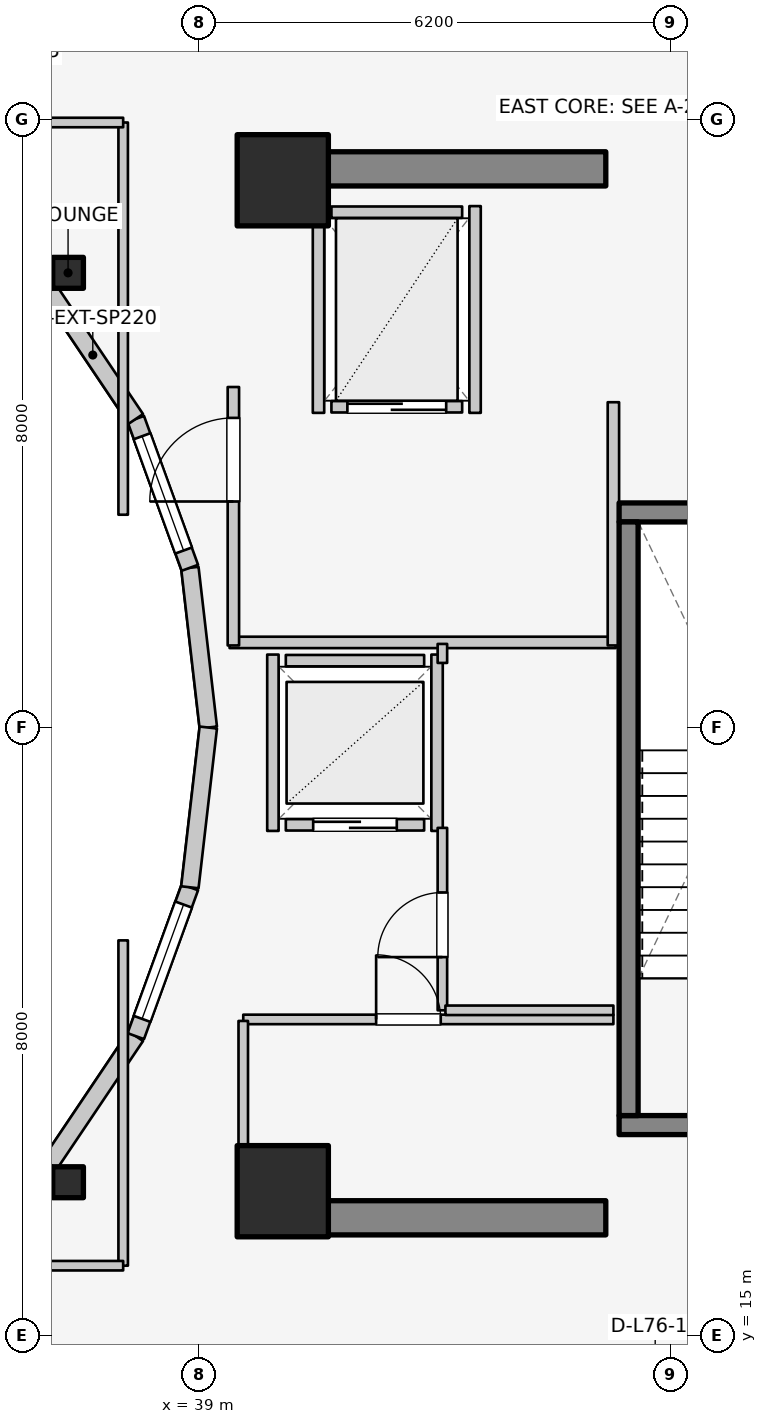
"""IFC4 building model, lengths in metres.
Left out: names, types, materials, properties, quantities, classifications, styles, units other than length and angle.
Written with IfcOpenShell. Run it as: python <this file> out.ifc"""

import sys

from ifc_helpers import new_model, si_unit, direction, frame, frame_2d, origin, origin_2d, place, context, subcontext, project, spatial, rectangle, i_section, extrude, element, fill, save


model = new_model("IFC4")
c1 = context("Model", 3, precision=1e-05, world=origin(), true_north=direction((0.0, 1.0)))
c2 = subcontext(c1, "Body", "Model", "MODEL_VIEW")
j1 = project(units=[si_unit("LENGTHUNIT", "METRE"), si_unit("PLANEANGLEUNIT", "RADIAN")], contexts=[c1])
p1 = place(None, origin())
s1 = spatial("IfcSite", under=j1, at=p1, CompositionType="ELEMENT")
p2 = place(p1, origin())
s2 = spatial("IfcBuilding", under=s1, at=p2, CompositionType="ELEMENT")
p3 = place(p2, frame((0.0, 0.0, 249.6)))
s3 = spatial("IfcBuildingStorey", under=s2, at=p3, CompositionType="ELEMENT", Elevation=249.6)
for number, where, z_axis, x_axis in (
    (1, (39.85, 16.55, 0.0), (0.0, 0.0, 1.0), (1.0, 0.0, 0.0)),
    (2, (39.85, 30.35, 0.0), (0.0, 0.0, 1.0), (1.0, 0.0, 0.0)),
):
    element("IfcWall", number, at=place(p3, frame(where, z_axis=z_axis, x_axis=x_axis)), inside=s3, PredefinedType="SHEAR", context=c2, shape_type="SweptSolid", body=[
        extrude(rectangle(XDim=4.5, YDim=0.45, at=frame_2d((2.25, 0.0))), origin(), (0.0, 0.0, 1.0), 3.6),
    ])
p4 = place(p3, frame((44.525, 17.77, 0.0), z_axis=(0.0, 0.0, 1.0), x_axis=(1.0, 0.0, 0.0)))
e3 = element("IfcWall", 3, at=p4, inside=s3, PredefinedType="SOLIDWALL", context=c2, shape_type="SweptSolid", body=[
    extrude(rectangle(XDim=3.37, YDim=0.25, at=frame_2d((1.685, 0.0))), origin(), (0.0, 0.0, 1.0), 3.6),
])
p5 = place(p4, frame((1.135, 0.0, 0.0)))
e4 = element("IfcOpeningElement", 4, at=p5, cuts=e3, PredefinedType="OPENING", context=c2, shape_type="SweptSolid", body=[
    extrude(rectangle(XDim=1.1, YDim=2.1, at=frame_2d((0.55, 1.05))), frame((0.0, 0.135, 0.0), z_axis=(0.0, -1.0, 0.0), x_axis=(1.0, 0.0, 0.0)), (0.0, 0.0, 1.0), 0.27),
])
p6 = place(p3, frame((44.525, 25.83, 0.0), z_axis=(0.0, 0.0, 1.0), x_axis=(1.0, 0.0, 0.0)))
e5 = element("IfcWall", 5, at=p6, inside=s3, PredefinedType="SOLIDWALL", context=c2, shape_type="SweptSolid", body=[
    extrude(rectangle(XDim=3.37, YDim=0.25, at=frame_2d((1.685, 0.0))), origin(), (0.0, 0.0, 1.0), 3.6),
])
p7 = place(p3, frame((44.65, 17.895, 0.0), z_axis=(0.0, 0.0, 1.0), x_axis=(0.0, 1.0, 0.0)))
e6 = element("IfcWall", 6, at=p7, inside=s3, PredefinedType="SOLIDWALL", context=c2, shape_type="SweptSolid", body=[
    extrude(rectangle(XDim=7.81, YDim=0.25, at=frame_2d((3.905, 0.0))), origin(), (0.0, 0.0, 1.0), 3.6),
])
for number, where, z_axis, x_axis in (
    (7, (40.1, 16.9, 0.0), (0.0, 0.0, 1.0), (1.0, 0.0, 0.0)),
    (8, (40.1, 30.2, 0.0), (0.0, 0.0, 1.0), (1.0, 0.0, 0.0)),
):
    element("IfcColumn", number, at=place(p3, frame(where, z_axis=z_axis, x_axis=x_axis)), inside=s3, PredefinedType="COLUMN", context=c2, shape_type="SweptSolid", body=[
        extrude(rectangle(XDim=1.2, YDim=1.2, at=origin_2d()), origin(), (0.0, 0.0, 1.0), 3.6),
    ])
for number, where, z_axis, x_axis in (
    (9, (37.275, 28.982, 0.0), (0.0, 0.0, 1.0), (1.0, 0.0, 0.0)),
    (10, (37.275, 17.018, 0.0), (0.0, 0.0, 1.0), (1.0, 0.0, 0.0)),
):
    element("IfcColumn", number, at=place(p3, frame(where, z_axis=z_axis, x_axis=x_axis)), inside=s3, PredefinedType="COLUMN", context=c2, shape_type="SweptSolid", body=[
        extrude(i_section(OverallWidth=0.404, OverallDepth=0.407, WebThickness=0.027, FlangeThickness=0.044, FilletRadius=0.025, at=origin_2d()), origin(), (0.0, 0.0, 1.0), 3.6),
    ])
p8 = place(p3, frame((39.12, 23.0, 0.0), z_axis=(0.0, 0.0, 1.0), x_axis=(-0.114711713601, 0.993398823617, 0.0)))
e11 = element("IfcWall", 11, at=p8, inside=s3, PredefinedType="STANDARD", context=c2, shape_type="SweptSolid", body=[
    extrude(rectangle(XDim=2.115, YDim=0.23, at=frame_2d((1.058, 0.0))), origin(), (0.0, 0.0, 1.0), 3.28),
])
p9 = place(p3, frame((38.877, 25.102, 0.0), z_axis=(0.0, 0.0, 1.0), x_axis=(-0.341423187295, 0.93990968033, 0.0)))
e12 = element("IfcWall", 12, at=p9, inside=s3, PredefinedType="STANDARD", context=c2, shape_type="SweptSolid", body=[
    extrude(rectangle(XDim=2.084, YDim=0.23, at=frame_2d((1.042, 0.0))), origin(), (0.0, 0.0, 1.0), 3.28),
])
p10 = place(p9, frame((0.242, 0.0, 0.85)))
e13 = element("IfcOpeningElement", 13, at=p10, cuts=e12, PredefinedType="OPENING", context=c2, shape_type="SweptSolid", body=[
    extrude(rectangle(XDim=1.6, YDim=1.65, at=frame_2d((0.8, 0.825))), frame((0.0, 0.125, 0.0), z_axis=(0.0, -1.0, 0.0), x_axis=(1.0, 0.0, 0.0)), (0.0, 0.0, 1.0), 0.25),
])
p11 = place(p3, frame((38.166, 27.06, 0.0), z_axis=(0.0, 0.0, 1.0), x_axis=(-0.558197800898, 0.829707909492, 0.0)))
e14 = element("IfcWall", 14, at=p11, inside=s3, PredefinedType="STANDARD", context=c2, shape_type="SweptSolid", body=[
    extrude(rectangle(XDim=2.027, YDim=0.23, at=frame_2d((1.013, 0.0))), origin(), (0.0, 0.0, 1.0), 2.6),
])
for number, where, z_axis, x_axis in (
    (15, (37.035, 28.742, 0.0), (0.0, 0.0, 1.0), (-0.753, 0.659, 0.0)),
    (16, (35.56, 15.968, 0.0), (0.0, 0.0, 1.0), (0.753, 0.659, 0.0)),
):
    element("IfcWall", number, at=place(p3, frame(where, z_axis=z_axis, x_axis=x_axis)), inside=s3, PredefinedType="STANDARD", context=c2, shape_type="SweptSolid", body=[
        extrude(rectangle(XDim=1.959, YDim=0.23, at=frame_2d((0.98, 0.0))), origin(), (0.0, 0.0, 1.0), 2.6),
    ])
p12 = place(p3, frame((37.035, 17.258, 0.0), z_axis=(0.0, 0.0, 1.0), x_axis=(0.558197800898, 0.829707909492, 0.0)))
e17 = element("IfcWall", 17, at=p12, inside=s3, PredefinedType="STANDARD", context=c2, shape_type="SweptSolid", body=[
    extrude(rectangle(XDim=2.027, YDim=0.23, at=frame_2d((1.013, 0.0))), origin(), (0.0, 0.0, 1.0), 2.6),
])
p13 = place(p3, frame((38.166, 18.94, 0.0), z_axis=(0.0, 0.0, 1.0), x_axis=(0.341423187295, 0.93990968033, 0.0)))
e18 = element("IfcWall", 18, at=p13, inside=s3, PredefinedType="STANDARD", context=c2, shape_type="SweptSolid", body=[
    extrude(rectangle(XDim=2.084, YDim=0.23, at=frame_2d((1.042, 0.0))), origin(), (0.0, 0.0, 1.0), 3.28),
])
p14 = place(p13, frame((0.242, 0.0, 0.85)))
e19 = element("IfcOpeningElement", 19, at=p14, cuts=e18, PredefinedType="OPENING", context=c2, shape_type="SweptSolid", body=[
    extrude(rectangle(XDim=1.6, YDim=1.65, at=frame_2d((0.8, 0.825))), frame((0.0, 0.125, 0.0), z_axis=(0.0, -1.0, 0.0), x_axis=(1.0, 0.0, 0.0)), (0.0, 0.0, 1.0), 0.25),
])
p15 = place(p3, frame((38.877, 20.898, 0.0), z_axis=(0.0, 0.0, 1.0), x_axis=(0.114711713601, 0.993398823617, 0.0)))
e20 = element("IfcWall", 20, at=p15, inside=s3, PredefinedType="STANDARD", context=c2, shape_type="SweptSolid", body=[
    extrude(rectangle(XDim=2.115, YDim=0.23, at=frame_2d((1.058, 0.0))), origin(), (0.0, 0.0, 1.0), 3.28),
])
p16 = place(p3, frame((40.14, 21.72, 0.0), z_axis=(0.0, 0.0, 1.0), x_axis=(1.0, 0.0, 0.0)))
e21 = element("IfcWall", 21, at=p16, inside=s3, PredefinedType="SOLIDWALL", context=c2, shape_type="SweptSolid", body=[
    extrude(rectangle(XDim=1.82, YDim=0.15, at=frame_2d((0.91, 0.0))), origin(), (0.0, 0.0, 1.0), 2.62),
])
p17 = place(p16, frame((0.36, 0.0, 0.0)))
e22 = element("IfcOpeningElement", 22, at=p17, cuts=e21, PredefinedType="OPENING", context=c2, shape_type="SweptSolid", body=[
    extrude(rectangle(XDim=1.1, YDim=2.1, at=frame_2d((0.55, 1.05))), frame((0.0, 0.085, 0.0), z_axis=(0.0, -1.0, 0.0), x_axis=(1.0, 0.0, 0.0)), (0.0, 0.0, 1.0), 0.17),
])
p18 = place(p3, frame((40.14, 23.88, 0.0), z_axis=(0.0, 0.0, 1.0), x_axis=(1.0, 0.0, 0.0)))
e23 = element("IfcWall", 23, at=p18, inside=s3, PredefinedType="SOLIDWALL", context=c2, shape_type="SweptSolid", body=[
    extrude(rectangle(XDim=1.82, YDim=0.15, at=frame_2d((0.91, 0.0))), origin(), (0.0, 0.0, 1.0), 2.62),
])
p19 = place(p3, frame((39.97, 21.64, 0.0), z_axis=(0.0, 0.0, 1.0), x_axis=(0.0, 1.0, 0.0)))
e24 = element("IfcWall", 24, at=p19, inside=s3, PredefinedType="SOLIDWALL", context=c2, shape_type="SweptSolid", body=[
    extrude(rectangle(XDim=2.32, YDim=0.15, at=frame_2d((1.16, 0.0))), origin(), (0.0, 0.0, 1.0), 2.62),
])
p20 = place(p3, frame((42.13, 21.64, 0.0), z_axis=(0.0, 0.0, 1.0), x_axis=(0.0, 1.0, 0.0)))
e25 = element("IfcWall", 25, at=p20, inside=s3, PredefinedType="SOLIDWALL", context=c2, shape_type="SweptSolid", body=[
    extrude(rectangle(XDim=2.32, YDim=0.15, at=frame_2d((1.16, 0.0))), origin(), (0.0, 0.0, 1.0), 3.295),
])
p21 = place(p3, frame((40.74, 27.22, 0.0), z_axis=(0.0, 0.0, 1.0), x_axis=(1.0, 0.0, 0.0)))
e26 = element("IfcWall", 26, at=p21, inside=s3, PredefinedType="SOLIDWALL", context=c2, shape_type="SweptSolid", body=[
    extrude(rectangle(XDim=1.72, YDim=0.15, at=frame_2d((0.86, 0.0))), origin(), (0.0, 0.0, 1.0), 3.295),
])
p22 = place(p21, frame((0.21, 0.0, 0.0)))
e27 = element("IfcOpeningElement", 27, at=p22, cuts=e26, PredefinedType="OPENING", context=c2, shape_type="SweptSolid", body=[
    extrude(rectangle(XDim=1.3, YDim=2.1, at=frame_2d((0.65, 1.05))), frame((0.0, 0.085, 0.0), z_axis=(0.0, -1.0, 0.0), x_axis=(1.0, 0.0, 0.0)), (0.0, 0.0, 1.0), 0.17),
])
p23 = place(p3, frame((40.74, 29.78, 0.0), z_axis=(0.0, 0.0, 1.0), x_axis=(1.0, 0.0, 0.0)))
e28 = element("IfcWall", 28, at=p23, inside=s3, PredefinedType="SOLIDWALL", context=c2, shape_type="SweptSolid", body=[
    extrude(rectangle(XDim=1.72, YDim=0.15, at=frame_2d((0.86, 0.0))), origin(), (0.0, 0.0, 1.0), 3.295),
])
for number, where, z_axis, x_axis in (
    (29, (40.57, 27.14, 0.0), (0.0, 0.0, 1.0), (0.0, 1.0, 0.0)),
    (30, (42.63, 27.14, 0.0), (0.0, 0.0, 1.0), (0.0, 1.0, 0.0)),
):
    element("IfcWall", number, at=place(p3, frame(where, z_axis=z_axis, x_axis=x_axis)), inside=s3, PredefinedType="SOLIDWALL", context=c2, shape_type="SweptSolid", body=[
        extrude(rectangle(XDim=2.72, YDim=0.15, at=frame_2d((1.36, 0.0))), origin(), (0.0, 0.0, 1.0), 3.295),
    ])
p24 = place(p3, frame((39.4, 24.12, 0.0), z_axis=(0.0, 0.0, 1.0), x_axis=(1.0, 0.0, 0.0)))
e31 = element("IfcWall", 31, at=p24, inside=s3, PredefinedType="PARTITIONING", context=c2, shape_type="SweptSolid", body=[
    extrude(rectangle(XDim=5.08, YDim=0.15, at=frame_2d((2.54, 0.0))), origin(), (0.0, 0.0, 1.0), 2.62),
])
p25 = place(p3, frame((44.45, 24.08, 0.0), z_axis=(0.0, 0.0, 1.0), x_axis=(0.0, 1.0, 0.0)))
e32 = element("IfcWall", 32, at=p25, inside=s3, PredefinedType="PARTITIONING", context=c2, shape_type="SweptSolid", body=[
    extrude(rectangle(XDim=3.2, YDim=0.15, at=frame_2d((1.6, 0.0))), origin(), (0.0, 0.0, 1.0), 3.295),
])
p26 = place(p3, frame((39.45, 24.08, 0.0), z_axis=(0.0, 0.0, 1.0), x_axis=(0.0, 1.0, 0.0)))
e33 = element("IfcWall", 33, at=p26, inside=s3, PredefinedType="PARTITIONING", context=c2, shape_type="SweptSolid", body=[
    extrude(rectangle(XDim=3.4, YDim=0.15, at=frame_2d((1.7, 0.0))), origin(), (0.0, 0.0, 1.0), 3.295),
])
p27 = place(p26, frame((1.894, 0.0, 0.0)))
e34 = element("IfcOpeningElement", 34, at=p27, cuts=e33, PredefinedType="OPENING", context=c2, shape_type="SweptSolid", body=[
    extrude(rectangle(XDim=1.1, YDim=2.1, at=frame_2d((0.55, 1.05))), frame((0.0, 0.085, 0.0), z_axis=(0.0, -1.0, 0.0), x_axis=(1.0, 0.0, 0.0)), (0.0, 0.0, 1.0), 0.17),
])
p28 = place(p3, frame((39.58, 19.16, 0.0), z_axis=(0.0, 0.0, 1.0), x_axis=(1.0, 0.0, 0.0)))
e35 = element("IfcWall", 35, at=p28, inside=s3, PredefinedType="PARTITIONING", context=c2, shape_type="SweptSolid", body=[
    extrude(rectangle(XDim=4.87, YDim=0.125, at=frame_2d((2.435, 0.0))), origin(), (0.0, 0.0, 1.0), 2.62),
])
p29 = place(p28, frame((1.748, 0.0, 0.0)))
e36 = element("IfcOpeningElement", 36, at=p29, cuts=e35, PredefinedType="OPENING", context=c2, shape_type="SweptSolid", body=[
    extrude(rectangle(XDim=0.85, YDim=2.05, at=frame_2d((0.425, 1.025))), frame((0.0, 0.073, 0.0), z_axis=(0.0, -1.0, 0.0), x_axis=(1.0, 0.0, 0.0)), (0.0, 0.0, 1.0), 0.145),
])
p30 = place(p3, frame((39.58, 17.1, 0.0), z_axis=(0.0, 0.0, 1.0), x_axis=(0.0, 1.0, 0.0)))
e37 = element("IfcWall", 37, at=p30, inside=s3, PredefinedType="PARTITIONING", context=c2, shape_type="SweptSolid", body=[
    extrude(rectangle(XDim=2.04, YDim=0.125, at=frame_2d((1.02, 0.0))), origin(), (0.0, 0.0, 1.0), 2.672),
])
p31 = place(p3, frame((42.2, 19.28, 0.0), z_axis=(0.0, 0.0, 1.0), x_axis=(0.0, 1.0, 0.0)))
e38 = element("IfcWall", 38, at=p31, inside=s3, PredefinedType="PARTITIONING", context=c2, shape_type="SweptSolid", body=[
    extrude(rectangle(XDim=2.4, YDim=0.125, at=frame_2d((1.2, 0.0))), origin(), (0.0, 0.0, 1.0), 3.295),
])
p32 = place(p31, frame((0.7, 0.0, 0.0)))
e39 = element("IfcOpeningElement", 39, at=p32, cuts=e38, PredefinedType="OPENING", context=c2, shape_type="SweptSolid", body=[
    extrude(rectangle(XDim=0.85, YDim=2.05, at=frame_2d((0.425, 1.025))), frame((0.0, 0.073, 0.0), z_axis=(0.0, -1.0, 0.0), x_axis=(1.0, 0.0, 0.0)), (0.0, 0.0, 1.0), 0.145),
])
p33 = place(p3, frame((42.2, 23.85, 0.0), z_axis=(0.0, 0.0, 1.0), x_axis=(0.0, 1.0, 0.0)))
e40 = element("IfcWall", 40, at=p33, inside=s3, PredefinedType="PARTITIONING", context=c2, shape_type="SweptSolid", body=[
    extrude(rectangle(XDim=0.25, YDim=0.125, at=frame_2d((0.125, 0.0))), origin(), (0.0, 0.0, 1.0), 3.295),
])
p34 = place(p3, frame((42.24, 19.28, 0.0), z_axis=(0.0, 0.0, 1.0), x_axis=(1.0, 0.0, 0.0)))
e41 = element("IfcWall", 41, at=p34, inside=s3, PredefinedType="PARTITIONING", context=c2, shape_type="SweptSolid", body=[
    extrude(rectangle(XDim=2.21, YDim=0.125, at=frame_2d((1.105, 0.0))), origin(), (0.0, 0.0, 1.0), 2.62),
])
p35 = place(p3, frame((35.55, 30.015, 0.0), z_axis=(0.0, 0.0, 1.0), x_axis=(0.522763432117, 0.852477796802, 0.0)))
e42 = element("IfcWall", 42, at=p35, inside=s3, PredefinedType="PARTITIONING", context=c2, shape_type="SweptSolid", body=[
    extrude(rectangle(XDim=3.269, YDim=0.125, at=frame_2d((1.635, 0.0))), origin(), (0.0, 0.0, 1.0), 2.672),
])
p36 = place(p3, frame((35.55, 15.985, 0.0), z_axis=(0.0, 0.0, 1.0), x_axis=(0.52592395012, -0.850531597702, 0.0)))
e43 = element("IfcWall", 43, at=p36, inside=s3, PredefinedType="PARTITIONING", context=c2, shape_type="SweptSolid", body=[
    extrude(rectangle(XDim=2.869, YDim=0.125, at=frame_2d((1.435, 0.0))), origin(), (0.0, 0.0, 1.0), 2.672),
])
p37 = place(p3, frame((38.0, 25.8, 0.0), z_axis=(0.0, 0.0, 1.0), x_axis=(0.0, 1.0, 0.0)))
e44 = element("IfcWall", 44, at=p37, inside=s3, PredefinedType="PARTITIONING", context=c2, shape_type="SweptSolid", body=[
    extrude(rectangle(XDim=5.16, YDim=0.125, at=frame_2d((2.58, 0.0))), origin(), (0.0, 0.0, 1.0), 2.672),
])
p38 = place(p3, frame((35.4, 30.96, 0.0), z_axis=(0.0, 0.0, 1.0), x_axis=(1.0, 0.0, 0.0)))
e45 = element("IfcWall", 45, at=p38, inside=s3, PredefinedType="PARTITIONING", context=c2, shape_type="SweptSolid", body=[
    extrude(rectangle(XDim=2.6, YDim=0.125, at=frame_2d((1.3, 0.0))), origin(), (0.0, 0.0, 1.0), 2.816),
])
p39 = place(p3, frame((38.0, 15.92, 0.0), z_axis=(0.0, 0.0, 1.0), x_axis=(0.0, 1.0, 0.0)))
e46 = element("IfcWall", 46, at=p39, inside=s3, PredefinedType="PARTITIONING", context=c2, shape_type="SweptSolid", body=[
    extrude(rectangle(XDim=4.28, YDim=0.125, at=frame_2d((2.14, 0.0))), origin(), (0.0, 0.0, 1.0), 2.672),
])
p40 = place(p3, frame((35.4, 15.92, 0.0), z_axis=(0.0, 0.0, 1.0), x_axis=(1.0, 0.0, 0.0)))
e47 = element("IfcWall", 47, at=p40, inside=s3, PredefinedType="PARTITIONING", context=c2, shape_type="SweptSolid", body=[
    extrude(rectangle(XDim=2.6, YDim=0.125, at=frame_2d((1.3, 0.0))), origin(), (0.0, 0.0, 1.0), 2.672),
])
p41 = place(p10, origin())
e48 = element("IfcWindow", 48, at=p41, inside=s3, PartitioningType="SINGLE_PANEL", PredefinedType="WINDOW", context=c2, shape_type="SweptSolid", body=[
    extrude(rectangle(XDim=1.6, YDim=1.65, at=frame_2d((0.8, 0.825))), frame((0.0, 0.03, 0.0), z_axis=(0.0, -1.0, 0.0), x_axis=(1.0, 0.0, 0.0)), (0.0, 0.0, 1.0), 0.06),
])
fill(e13, e48)
p42 = place(p14, origin())
e49 = element("IfcWindow", 49, at=p42, inside=s3, PartitioningType="SINGLE_PANEL", PredefinedType="WINDOW", context=c2, shape_type="SweptSolid", body=[
    extrude(rectangle(XDim=1.6, YDim=1.65, at=frame_2d((0.8, 0.825))), frame((0.0, 0.03, 0.0), z_axis=(0.0, -1.0, 0.0), x_axis=(1.0, 0.0, 0.0)), (0.0, 0.0, 1.0), 0.06),
])
fill(e19, e49)
p43 = place(p17, origin())
e50 = element("IfcDoor", 50, at=p43, inside=s3, OperationType="DOUBLE_DOOR_SLIDING", PredefinedType="DOOR", context=c2, shape_type="SweptSolid", body=[
    extrude(rectangle(XDim=1.1, YDim=2.1, at=frame_2d((0.55, 1.05))), frame((0.0, 0.025, 0.0), z_axis=(0.0, -1.0, 0.0), x_axis=(1.0, 0.0, 0.0)), (0.0, 0.0, 1.0), 0.05),
])
fill(e22, e50)
p44 = place(p22, origin())
e51 = element("IfcDoor", 51, at=p44, inside=s3, OperationType="DOUBLE_DOOR_SLIDING", PredefinedType="DOOR", context=c2, shape_type="SweptSolid", body=[
    extrude(rectangle(XDim=1.3, YDim=2.1, at=frame_2d((0.65, 1.05))), frame((0.0, 0.025, 0.0), z_axis=(0.0, -1.0, 0.0), x_axis=(1.0, 0.0, 0.0)), (0.0, 0.0, 1.0), 0.05),
])
fill(e27, e51)
p45 = place(p27, origin())
e52 = element("IfcDoor", 52, at=p45, inside=s3, OperationType="SINGLE_SWING_LEFT", PredefinedType="DOOR", context=c2, shape_type="SweptSolid", body=[
    extrude(rectangle(XDim=1.1, YDim=2.1, at=frame_2d((0.55, 1.05))), frame((0.0, 0.025, 0.0), z_axis=(0.0, -1.0, 0.0), x_axis=(1.0, 0.0, 0.0)), (0.0, 0.0, 1.0), 0.05),
])
fill(e34, e52)
p46 = place(p29, origin())
e53 = element("IfcDoor", 53, at=p46, inside=s3, OperationType="SINGLE_SWING_LEFT", PredefinedType="DOOR", context=c2, shape_type="SweptSolid", body=[
    extrude(rectangle(XDim=0.85, YDim=2.05, at=frame_2d((0.425, 1.025))), frame((0.0, 0.025, 0.0), z_axis=(0.0, -1.0, 0.0), x_axis=(1.0, 0.0, 0.0)), (0.0, 0.0, 1.0), 0.05),
])
fill(e36, e53)
p47 = place(p32, origin())
e54 = element("IfcDoor", 54, at=p47, inside=s3, OperationType="SINGLE_SWING_LEFT", PredefinedType="DOOR", context=c2, shape_type="SweptSolid", body=[
    extrude(rectangle(XDim=0.85, YDim=2.05, at=frame_2d((0.425, 1.025))), frame((0.0, 0.025, 0.0), z_axis=(0.0, -1.0, 0.0), x_axis=(1.0, 0.0, 0.0)), (0.0, 0.0, 1.0), 0.05),
])
fill(e39, e54)
save(model, sys.argv[1])
